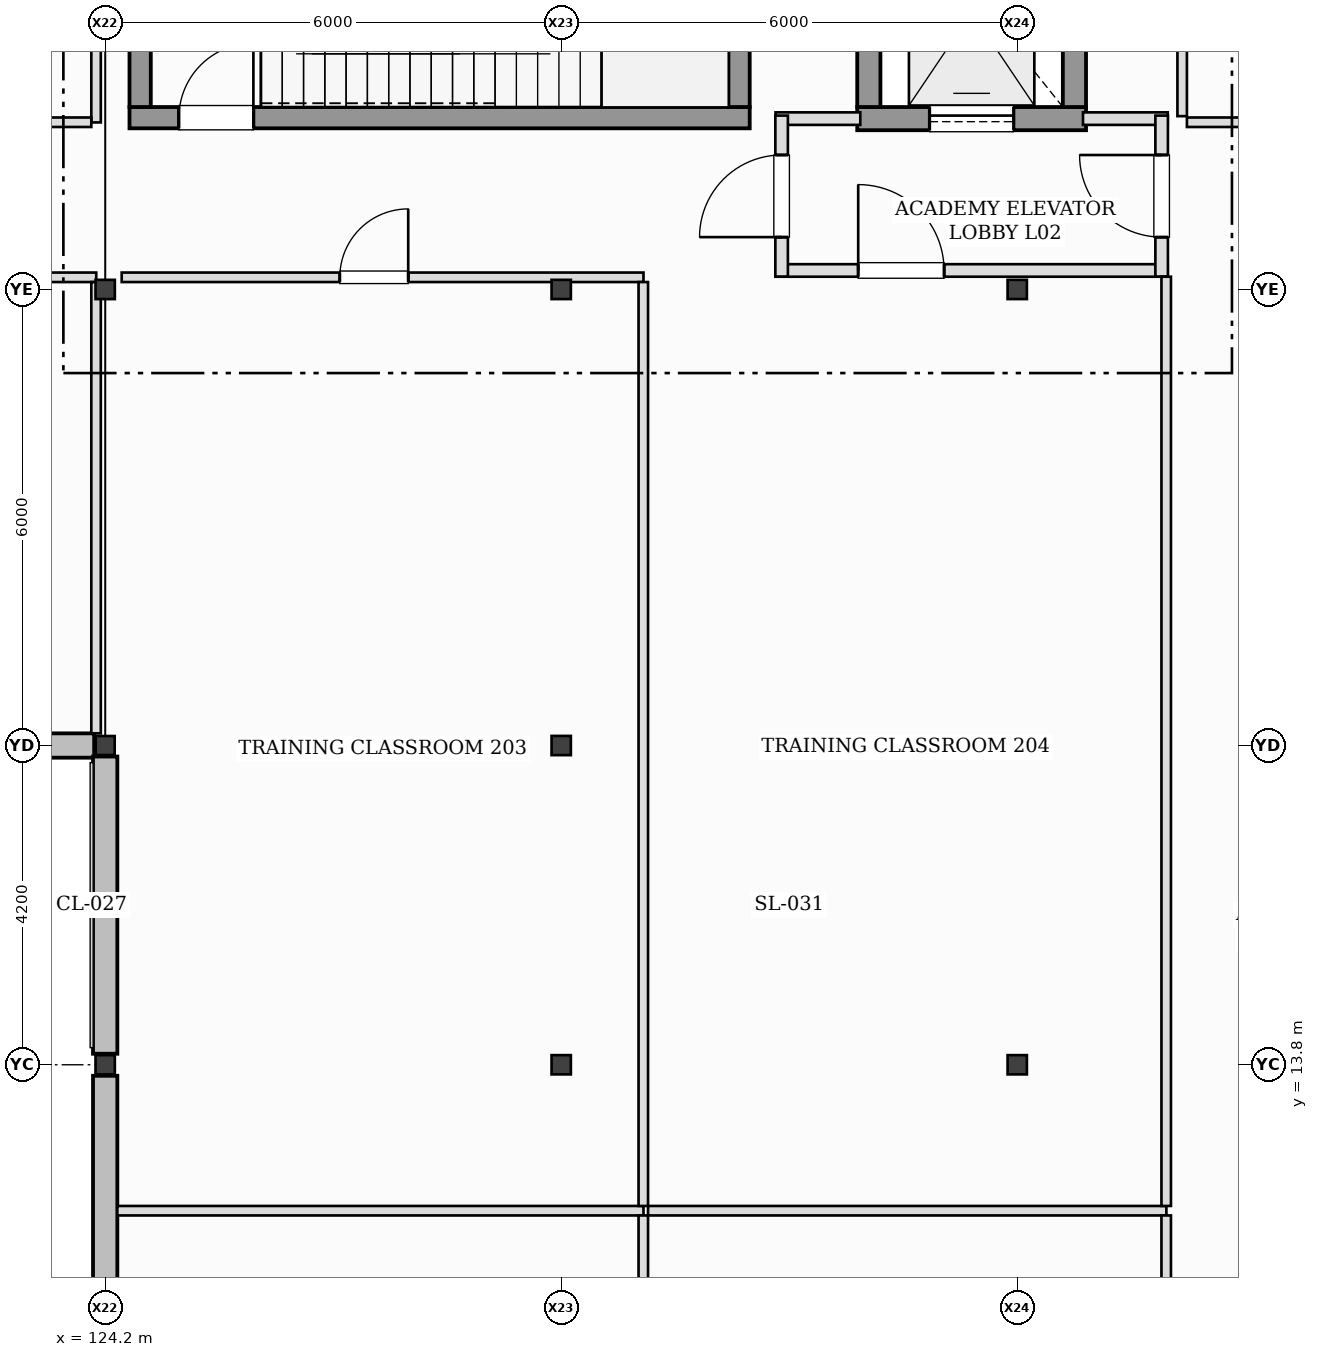
"""IFC4 building model, lengths in metres.
Left out: names, types, materials, properties, quantities, classifications, styles, units other than length and angle.
Written with IfcOpenShell. Run it as: python <this file> out.ifc"""

import sys

from ifc_helpers import new_model, si_unit, direction, frame, frame_2d, origin, origin_2d, place, context, subcontext, project, spatial, rectangle, hollow_rectangle, i_section, extrude, element, fill, save


model = new_model("IFC4")
c1 = context("Model", 3, precision=1e-05, world=origin(), true_north=direction((0.0, 1.0)))
c2 = subcontext(c1, "Body", "Model", "MODEL_VIEW")
j1 = project(units=[si_unit("LENGTHUNIT", "METRE"), si_unit("PLANEANGLEUNIT", "RADIAN")], contexts=[c1])
p1 = place(None, origin())
s1 = spatial("IfcSite", under=j1, at=p1, CompositionType="ELEMENT")
p2 = place(p1, origin())
s2 = spatial("IfcBuilding", under=s1, at=p2, CompositionType="ELEMENT")
p3 = place(p2, frame((0.0, 0.0, 6.0)))
s3 = spatial("IfcBuildingStorey", under=s2, at=p3, CompositionType="ELEMENT", Elevation=6.0)
p4 = place(p3, frame((124.2, 13.8, 0.0), z_axis=(0.0, 0.0, 1.0), x_axis=(1.0, 0.0, 0.0)))
e1 = element("IfcColumn", 1, at=p4, inside=s3, PredefinedType="COLUMN", context=c2, shape_type="SweptSolid", body=[
    extrude(i_section(OverallWidth=0.254, OverallDepth=0.253, WebThickness=0.009, FlangeThickness=0.014, at=origin_2d()), origin(), (0.0, 0.0, 1.0), 4.0),
])
p5 = place(p3, frame((124.2, 18.0, 0.0), z_axis=(0.0, 0.0, 1.0), x_axis=(1.0, 0.0, 0.0)))
e2 = element("IfcColumn", 2, at=p5, inside=s3, PredefinedType="COLUMN", context=c2, shape_type="SweptSolid", body=[
    extrude(hollow_rectangle(XDim=0.25, YDim=0.25, WallThickness=0.012, at=origin_2d()), origin(), (0.0, 0.0, 1.0), 4.0),
])
for number, where, z_axis, x_axis in (
    (3, (124.2, 24.0, 0.0), (0.0, 0.0, 1.0), (1.0, 0.0, 0.0)),
    (4, (130.2, 13.8, 0.0), (0.0, 0.0, 1.0), (1.0, 0.0, 0.0)),
    (5, (130.2, 18.0, 0.0), (0.0, 0.0, 1.0), (1.0, 0.0, 0.0)),
    (6, (130.2, 24.0, 0.0), (0.0, 0.0, 1.0), (1.0, 0.0, 0.0)),
    (7, (136.2, 13.8, 0.0), (0.0, 0.0, 1.0), (1.0, 0.0, 0.0)),
):
    element("IfcColumn", number, at=place(p3, frame(where, z_axis=z_axis, x_axis=x_axis)), inside=s3, PredefinedType="COLUMN", context=c2, shape_type="SweptSolid", body=[
        extrude(i_section(OverallWidth=0.254, OverallDepth=0.253, WebThickness=0.009, FlangeThickness=0.014, at=origin_2d()), origin(), (0.0, 0.0, 1.0), 4.0),
    ])
p6 = place(p3, frame((136.2, 18.0, 0.0), z_axis=(0.0, 0.0, 1.0), x_axis=(1.0, 0.0, 0.0)))
e8 = element("IfcColumn", 8, at=p6, inside=s3, PredefinedType="COLUMN", context=c2, shape_type="SweptSolid", body=[
    extrude(hollow_rectangle(XDim=0.25, YDim=0.25, WallThickness=0.012, at=origin_2d()), origin(), (0.0, 0.0, 1.0), 4.0),
])
p7 = place(p3, frame((136.2, 24.0, 0.0), z_axis=(0.0, 0.0, 1.0), x_axis=(1.0, 0.0, 0.0)))
e9 = element("IfcColumn", 9, at=p7, inside=s3, PredefinedType="COLUMN", context=c2, shape_type="SweptSolid", body=[
    extrude(i_section(OverallWidth=0.254, OverallDepth=0.253, WebThickness=0.009, FlangeThickness=0.014, at=origin_2d()), origin(), (0.0, 0.0, 1.0), 4.0),
])
p8 = place(p3, frame((118.345, 18.0, 0.0), z_axis=(0.0, 0.0, 1.0), x_axis=(1.0, 0.0, 0.0)))
e10 = element("IfcWall", 10, at=p8, inside=s3, PredefinedType="STANDARD", context=c2, shape_type="SweptSolid", body=[
    extrude(rectangle(XDim=5.71, YDim=0.32, at=frame_2d((2.855, 0.0))), origin(), (0.0, 0.0, 1.0), 3.619),
])
p9 = place(p8, frame((0.741, 0.0, 1.28)))
e11 = element("IfcOpeningElement", 11, at=p9, cuts=e10, PredefinedType="OPENING", context=c2, shape_type="SweptSolid", body=[
    extrude(rectangle(XDim=1.5, YDim=1.5, at=frame_2d((0.75, 0.75))), frame((0.0, 0.17, 0.0), z_axis=(0.0, -1.0, 0.0), x_axis=(1.0, 0.0, 0.0)), (0.0, 0.0, 1.0), 0.34),
])
p10 = place(p8, frame((3.525, 0.0, 1.18)))
e12 = element("IfcOpeningElement", 12, at=p10, cuts=e10, PredefinedType="OPENING", context=c2, shape_type="SweptSolid", body=[
    extrude(rectangle(XDim=1.02, YDim=1.02, at=frame_2d((0.51, 0.51))), frame((0.0, 0.17, 0.0), z_axis=(0.0, -1.0, 0.0), x_axis=(1.0, 0.0, 0.0)), (0.0, 0.0, 1.0), 0.34),
])
p11 = place(p3, frame((124.2, 13.655, 0.0), z_axis=(0.0, 0.0, 1.0), x_axis=(0.0, -1.0, 0.0)))
e13 = element("IfcWall", 13, at=p11, inside=s3, PredefinedType="STANDARD", context=c2, shape_type="SweptSolid", body=[
    extrude(rectangle(XDim=5.71, YDim=0.32, at=frame_2d((2.855, 0.0))), origin(), (0.0, 0.0, 1.0), 3.227),
])
p12 = place(p11, frame((3.933, 0.0, 1.28)))
e14 = element("IfcOpeningElement", 14, at=p12, cuts=e13, PredefinedType="OPENING", context=c2, shape_type="SweptSolid", body=[
    extrude(rectangle(XDim=0.9, YDim=0.9, at=frame_2d((0.45, 0.45))), frame((0.0, 0.17, 0.0), z_axis=(0.0, -1.0, 0.0), x_axis=(1.0, 0.0, 0.0)), (0.0, 0.0, 1.0), 0.34),
])
p13 = place(p3, frame((124.2, 17.855, 0.0), z_axis=(0.0, 0.0, 1.0), x_axis=(0.0, -1.0, 0.0)))
e15 = element("IfcWall", 15, at=p13, inside=s3, PredefinedType="STANDARD", context=c2, shape_type="SweptSolid", body=[
    extrude(rectangle(XDim=3.91, YDim=0.32, at=frame_2d((1.955, 0.0))), origin(), (0.0, 0.0, 1.0), 3.227),
])
p14 = place(p3, frame((124.52, 26.26, 0.0), z_axis=(0.0, 0.0, 1.0), x_axis=(1.0, 0.0, 0.0)))
e16 = element("IfcWall", 16, at=p14, inside=s3, PredefinedType="SHEAR", context=c2, shape_type="SweptSolid", body=[
    extrude(rectangle(XDim=8.16, YDim=0.28, at=frame_2d((4.08, 0.0))), origin(), (0.0, 0.0, 1.0), 4.0),
])
p15 = place(p14, frame((0.65, 0.0, 0.0)))
e17 = element("IfcOpeningElement", 17, at=p15, cuts=e16, PredefinedType="OPENING", context=c2, shape_type="SweptSolid", body=[
    extrude(rectangle(XDim=0.98, YDim=2.15, at=frame_2d((0.49, 1.075))), frame((0.0, 0.15, 0.0), z_axis=(0.0, -1.0, 0.0), x_axis=(1.0, 0.0, 0.0)), (0.0, 0.0, 1.0), 0.3),
])
for number, where, z_axis, x_axis in (
    (18, (124.66, 29.4, 0.0), (0.0, 0.0, 1.0), (0.0, -1.0, 0.0)),
    (19, (132.54, 26.4, 0.0), (0.0, 0.0, 1.0), (0.0, 1.0, 0.0)),
):
    element("IfcWall", number, at=place(p3, frame(where, z_axis=z_axis, x_axis=x_axis)), inside=s3, PredefinedType="SHEAR", context=c2, shape_type="SweptSolid", body=[
        extrude(rectangle(XDim=3.0, YDim=0.28, at=frame_2d((1.5, 0.0))), origin(), (0.0, 0.0, 1.0), 4.0),
    ])
p16 = place(p3, frame((134.095, 26.248, 0.0), z_axis=(0.0, 0.0, 1.0), x_axis=(1.0, 0.0, 0.0)))
e20 = element("IfcWall", 20, at=p16, inside=s3, PredefinedType="SHEAR", context=c2, shape_type="SweptSolid", body=[
    extrude(rectangle(XDim=3.01, YDim=0.305, at=frame_2d((1.505, 0.0))), origin(), (0.0, 0.0, 1.0), 4.0),
])
p17 = place(p16, frame((0.955, 0.0, 0.0)))
e21 = element("IfcOpeningElement", 21, at=p17, cuts=e20, PredefinedType="OPENING", context=c2, shape_type="SweptSolid", body=[
    extrude(rectangle(XDim=1.1, YDim=2.15, at=frame_2d((0.55, 1.075))), frame((0.0, 0.162, 0.0), z_axis=(0.0, -1.0, 0.0), x_axis=(1.0, 0.0, 0.0)), (0.0, 0.0, 1.0), 0.325),
])
for number, where, z_axis, x_axis in (
    (22, (134.248, 29.4, 0.0), (0.0, 0.0, 1.0), (0.0, -1.0, 0.0)),
    (23, (136.952, 26.4, 0.0), (0.0, 0.0, 1.0), (0.0, 1.0, 0.0)),
):
    element("IfcWall", number, at=place(p3, frame(where, z_axis=z_axis, x_axis=x_axis)), inside=s3, PredefinedType="SHEAR", context=c2, shape_type="SweptSolid", body=[
        extrude(rectangle(XDim=3.0, YDim=0.305, at=frame_2d((1.5, 0.0))), origin(), (0.0, 0.0, 1.0), 4.0),
    ])
p18 = place(p3, frame((133.02, 24.25, 0.0), z_axis=(0.0, 0.0, 1.0), x_axis=(1.0, 0.0, 0.0)))
e24 = element("IfcWall", 24, at=p18, inside=s3, PredefinedType="PARTITIONING", context=c2, shape_type="SweptSolid", body=[
    extrude(rectangle(XDim=5.16, YDim=0.165, at=frame_2d((2.58, 0.0))), origin(), (0.0, 0.0, 1.0), 3.153),
])
p19 = place(p18, frame((1.087, 0.0, 0.0)))
e25 = element("IfcOpeningElement", 25, at=p19, cuts=e24, PredefinedType="OPENING", context=c2, shape_type="SweptSolid", body=[
    extrude(rectangle(XDim=1.13, YDim=2.18, at=frame_2d((0.565, 1.09))), frame((0.0, 0.093, 0.0), z_axis=(0.0, -1.0, 0.0), x_axis=(1.0, 0.0, 0.0)), (0.0, 0.0, 1.0), 0.185),
])
for number, where, z_axis, x_axis in (
    (26, (133.02, 26.248, 0.0), (0.0, 0.0, 1.0), (1.0, 0.0, 0.0)),
    (27, (137.065, 26.248, 0.0), (0.0, 0.0, 1.0), (1.0, 0.0, 0.0)),
):
    element("IfcWall", number, at=place(p3, frame(where, z_axis=z_axis, x_axis=x_axis)), inside=s3, PredefinedType="PARTITIONING", context=c2, shape_type="SweptSolid", body=[
        extrude(rectangle(XDim=1.115, YDim=0.165, at=frame_2d((0.558, 0.0))), origin(), (0.0, 0.0, 1.0), 3.72),
    ])
p20 = place(p3, frame((133.1, 24.17, 0.0), z_axis=(0.0, 0.0, 1.0), x_axis=(0.0, 1.0, 0.0)))
e28 = element("IfcWall", 28, at=p20, inside=s3, PredefinedType="PARTITIONING", context=c2, shape_type="SweptSolid", body=[
    extrude(rectangle(XDim=2.118, YDim=0.165, at=frame_2d((1.059, 0.0))), origin(), (0.0, 0.0, 1.0), 3.72),
])
p21 = place(p20, frame((0.519, 0.0, 0.0)))
e29 = element("IfcOpeningElement", 29, at=p21, cuts=e28, PredefinedType="OPENING", context=c2, shape_type="SweptSolid", body=[
    extrude(rectangle(XDim=1.08, YDim=2.14, at=frame_2d((0.54, 1.07))), frame((0.0, 0.093, 0.0), z_axis=(0.0, -1.0, 0.0), x_axis=(1.0, 0.0, 0.0)), (0.0, 0.0, 1.0), 0.185),
])
p22 = place(p3, frame((138.1, 24.17, 0.0), z_axis=(0.0, 0.0, 1.0), x_axis=(0.0, 1.0, 0.0)))
e30 = element("IfcWall", 30, at=p22, inside=s3, PredefinedType="PARTITIONING", context=c2, shape_type="SweptSolid", body=[
    extrude(rectangle(XDim=2.118, YDim=0.165, at=frame_2d((1.059, 0.0))), origin(), (0.0, 0.0, 1.0), 3.379),
])
p23 = place(p22, frame((0.519, 0.0, 0.0)))
e31 = element("IfcOpeningElement", 31, at=p23, cuts=e30, PredefinedType="OPENING", context=c2, shape_type="SweptSolid", body=[
    extrude(rectangle(XDim=1.08, YDim=2.14, at=frame_2d((0.54, 1.07))), frame((0.0, 0.093, 0.0), z_axis=(0.0, -1.0, 0.0), x_axis=(1.0, 0.0, 0.0)), (0.0, 0.0, 1.0), 0.185),
])
p24 = place(p3, frame((114.298, 24.16, 0.0), z_axis=(0.0, 0.0, 1.0), x_axis=(1.0, 0.0, 0.0)))
e32 = element("IfcWall", 32, at=p24, inside=s3, PredefinedType="PARTITIONING", context=c2, shape_type="SweptSolid", body=[
    extrude(rectangle(XDim=9.785, YDim=0.125, at=frame_2d((4.893, 0.0))), origin(), (0.0, 0.0, 1.0), 3.72),
])
p25 = place(p24, frame((4.44, 0.0, 0.0)))
e33 = element("IfcOpeningElement", 33, at=p25, cuts=e32, PredefinedType="OPENING", context=c2, shape_type="SweptSolid", body=[
    extrude(rectangle(XDim=1.58, YDim=2.2, at=frame_2d((0.79, 1.1))), frame((0.0, 0.073, 0.0), z_axis=(0.0, -1.0, 0.0), x_axis=(1.0, 0.0, 0.0)), (0.0, 0.0, 1.0), 0.145),
])
p26 = place(p3, frame((124.08, 24.097, 0.0), z_axis=(0.0, 0.0, 1.0), x_axis=(0.0, -1.0, 0.0)))
e34 = element("IfcWall", 34, at=p26, inside=s3, PredefinedType="PARTITIONING", context=c2, shape_type="SweptSolid", body=[
    extrude(rectangle(XDim=5.938, YDim=0.125, at=frame_2d((2.969, 0.0))), origin(), (0.0, 0.0, 1.0), 3.72),
])
p27 = place(p3, frame((124.08, 29.84, 0.0), z_axis=(0.0, 0.0, 1.0), x_axis=(0.0, -1.0, 0.0)))
e35 = element("IfcWall", 35, at=p27, inside=s3, PredefinedType="PARTITIONING", context=c2, shape_type="SweptSolid", body=[
    extrude(rectangle(XDim=3.643, YDim=0.125, at=frame_2d((1.821, 0.0))), origin(), (0.0, 0.0, 1.0), 3.72),
])
p28 = place(p3, frame((124.018, 26.2, 0.0), z_axis=(0.0, 0.0, 1.0), x_axis=(-1.0, 0.0, 0.0)))
e36 = element("IfcWall", 36, at=p28, inside=s3, PredefinedType="PARTITIONING", context=c2, shape_type="SweptSolid", body=[
    extrude(rectangle(XDim=9.655, YDim=0.125, at=frame_2d((4.828, 0.0))), origin(), (0.0, 0.0, 1.0), 3.72),
])
p29 = place(p28, frame((4.2, 0.0, 0.0)))
e37 = element("IfcOpeningElement", 37, at=p29, cuts=e36, PredefinedType="OPENING", context=c2, shape_type="SweptSolid", body=[
    extrude(rectangle(XDim=1.03, YDim=2.15, at=frame_2d((0.515, 1.075))), frame((0.0, 0.073, 0.0), z_axis=(0.0, -1.0, 0.0), x_axis=(1.0, 0.0, 0.0)), (0.0, 0.0, 1.0), 0.145),
])
p30 = place(p3, frame((124.36, 11.88, 0.0), z_axis=(0.0, 0.0, 1.0), x_axis=(1.0, 0.0, 0.0)))
e38 = element("IfcWall", 38, at=p30, inside=s3, PredefinedType="PARTITIONING", context=c2, shape_type="SweptSolid", body=[
    extrude(rectangle(XDim=6.922, YDim=0.125, at=frame_2d((3.461, 0.0))), origin(), (0.0, 0.0, 1.0), 3.72),
])
p31 = place(p3, frame((131.28, 11.817, 0.0), z_axis=(0.0, 0.0, 1.0), x_axis=(0.0, -1.0, 0.0)))
e39 = element("IfcWall", 39, at=p31, inside=s3, PredefinedType="PARTITIONING", context=c2, shape_type="SweptSolid", body=[
    extrude(rectangle(XDim=9.857, YDim=0.125, at=frame_2d((4.929, 0.0))), origin(), (0.0, 0.0, 1.0), 3.72),
])
p32 = place(p31, frame((4.574, 0.0, 0.0)))
e40 = element("IfcOpeningElement", 40, at=p32, cuts=e39, PredefinedType="OPENING", context=c2, shape_type="SweptSolid", body=[
    extrude(rectangle(XDim=0.93, YDim=2.1, at=frame_2d((0.465, 1.05))), frame((0.0, 0.073, 0.0), z_axis=(0.0, -1.0, 0.0), x_axis=(1.0, 0.0, 0.0)), (0.0, 0.0, 1.0), 0.145),
])
p33 = place(p3, frame((131.343, 11.88, 0.0), z_axis=(0.0, 0.0, 1.0), x_axis=(1.0, 0.0, 0.0)))
e41 = element("IfcWall", 41, at=p33, inside=s3, PredefinedType="PARTITIONING", context=c2, shape_type="SweptSolid", body=[
    extrude(rectangle(XDim=6.82, YDim=0.125, at=frame_2d((3.41, 0.0))), origin(), (0.0, 0.0, 1.0), 3.72),
])
p34 = place(p3, frame((138.16, 11.817, 0.0), z_axis=(0.0, 0.0, 1.0), x_axis=(0.0, -1.0, 0.0)))
e42 = element("IfcWall", 42, at=p34, inside=s3, PredefinedType="PARTITIONING", context=c2, shape_type="SweptSolid", body=[
    extrude(rectangle(XDim=9.857, YDim=0.125, at=frame_2d((4.929, 0.0))), origin(), (0.0, 0.0, 1.0), 3.449),
])
p35 = place(p34, frame((4.349, 0.0, 0.0)))
e43 = element("IfcOpeningElement", 43, at=p35, cuts=e42, PredefinedType="OPENING", context=c2, shape_type="SweptSolid", body=[
    extrude(rectangle(XDim=1.16, YDim=2.2, at=frame_2d((0.58, 1.1))), frame((0.0, 0.073, 0.0), z_axis=(0.0, -1.0, 0.0), x_axis=(1.0, 0.0, 0.0)), (0.0, 0.0, 1.0), 0.145),
])
p36 = place(p3, frame((124.417, 24.16, 0.0), z_axis=(0.0, 0.0, 1.0), x_axis=(1.0, 0.0, 0.0)))
e44 = element("IfcWall", 44, at=p36, inside=s3, PredefinedType="PARTITIONING", context=c2, shape_type="SweptSolid", body=[
    extrude(rectangle(XDim=6.865, YDim=0.125, at=frame_2d((3.433, 0.0))), origin(), (0.0, 0.0, 1.0), 3.153),
])
p37 = place(p36, frame((2.87, 0.0, 0.0)))
e45 = element("IfcOpeningElement", 45, at=p37, cuts=e44, PredefinedType="OPENING", context=c2, shape_type="SweptSolid", body=[
    extrude(rectangle(XDim=0.9, YDim=2.1, at=frame_2d((0.45, 1.05))), frame((0.0, 0.073, 0.0), z_axis=(0.0, -1.0, 0.0), x_axis=(1.0, 0.0, 0.0)), (0.0, 0.0, 1.0), 0.145),
])
p38 = place(p3, frame((131.28, 24.097, 0.0), z_axis=(0.0, 0.0, 1.0), x_axis=(0.0, -1.0, 0.0)))
e46 = element("IfcWall", 46, at=p38, inside=s3, PredefinedType="PARTITIONING", context=c2, shape_type="SweptSolid", body=[
    extrude(rectangle(XDim=12.155, YDim=0.125, at=frame_2d((6.078, 0.0))), origin(), (0.0, 0.0, 1.0), 3.72),
])
p39 = place(p3, frame((138.16, 24.167, 0.0), z_axis=(0.0, 0.0, 1.0), x_axis=(0.0, -1.0, 0.0)))
e47 = element("IfcWall", 47, at=p39, inside=s3, PredefinedType="PARTITIONING", context=c2, shape_type="SweptSolid", body=[
    extrude(rectangle(XDim=12.225, YDim=0.125, at=frame_2d((6.113, 0.0))), origin(), (0.0, 0.0, 1.0), 3.289),
])
p40 = place(p3, frame((138.37, 26.28, 0.0), z_axis=(0.0, 0.0, 1.0), x_axis=(0.0, 1.0, 0.0)))
e48 = element("IfcWall", 48, at=p40, inside=s3, PredefinedType="PARTITIONING", context=c2, shape_type="SweptSolid", body=[
    extrude(rectangle(XDim=3.56, YDim=0.125, at=frame_2d((1.78, 0.0))), origin(), (0.0, 0.0, 1.0), 3.379),
])
p41 = place(p3, frame((157.72, 26.2, 0.0), z_axis=(0.0, 0.0, 1.0), x_axis=(-1.0, 0.0, 0.0)))
e49 = element("IfcWall", 49, at=p41, inside=s3, PredefinedType="PARTITIONING", context=c2, shape_type="SweptSolid", body=[
    extrude(rectangle(XDim=19.287, YDim=0.125, at=frame_2d((9.644, 0.0))), origin(), (0.0, 0.0, 1.0), 3.72),
])
p42 = place(p41, frame((9.018, 0.0, 0.0)))
e50 = element("IfcOpeningElement", 50, at=p42, cuts=e49, PredefinedType="OPENING", context=c2, shape_type="SweptSolid", body=[
    extrude(rectangle(XDim=1.03, YDim=2.15, at=frame_2d((0.515, 1.075))), frame((0.0, 0.073, 0.0), z_axis=(0.0, -1.0, 0.0), x_axis=(1.0, 0.0, 0.0)), (0.0, 0.0, 1.0), 0.145),
])
p43 = place(p15, origin())
e51 = element("IfcDoor", 51, at=p43, inside=s3, OperationType="SINGLE_SWING_RIGHT", PredefinedType="DOOR", context=c2, shape_type="SweptSolid", body=[
    extrude(rectangle(XDim=0.98, YDim=2.15, at=frame_2d((0.49, 1.075))), frame((0.0, 0.025, 0.0), z_axis=(0.0, -1.0, 0.0), x_axis=(1.0, 0.0, 0.0)), (0.0, 0.0, 1.0), 0.05),
])
fill(e17, e51)
p44 = place(p17, origin())
e52 = element("IfcDoor", 52, at=p44, inside=s3, OperationType="SLIDING_TO_LEFT", PredefinedType="DOOR", context=c2, shape_type="SweptSolid", body=[
    extrude(rectangle(XDim=1.1, YDim=2.15, at=frame_2d((0.55, 1.075))), frame((0.0, 0.025, 0.0), z_axis=(0.0, -1.0, 0.0), x_axis=(1.0, 0.0, 0.0)), (0.0, 0.0, 1.0), 0.05),
])
fill(e21, e52)
p45 = place(p21, frame((1.08, 0.0, 0.0), z_axis=(0.0, 0.0, 1.0), x_axis=(-1.0, 0.0, 0.0)))
e53 = element("IfcDoor", 53, at=p45, inside=s3, OperationType="SINGLE_SWING_LEFT", PredefinedType="DOOR", context=c2, shape_type="SweptSolid", body=[
    extrude(rectangle(XDim=1.08, YDim=2.14, at=frame_2d((0.54, 1.07))), frame((0.0, 0.025, 0.0), z_axis=(0.0, -1.0, 0.0), x_axis=(1.0, 0.0, 0.0)), (0.0, 0.0, 1.0), 0.05),
])
fill(e29, e53)
p46 = place(p23, origin())
e54 = element("IfcDoor", 54, at=p46, inside=s3, OperationType="SINGLE_SWING_RIGHT", PredefinedType="DOOR", context=c2, shape_type="SweptSolid", body=[
    extrude(rectangle(XDim=1.08, YDim=2.14, at=frame_2d((0.54, 1.07))), frame((0.0, 0.025, 0.0), z_axis=(0.0, -1.0, 0.0), x_axis=(1.0, 0.0, 0.0)), (0.0, 0.0, 1.0), 0.05),
])
fill(e31, e54)
p47 = place(p37, frame((0.9, 0.0, 0.0), z_axis=(0.0, 0.0, 1.0), x_axis=(-1.0, 0.0, 0.0)))
e55 = element("IfcDoor", 55, at=p47, inside=s3, OperationType="SINGLE_SWING_RIGHT", PredefinedType="DOOR", context=c2, shape_type="SweptSolid", body=[
    extrude(rectangle(XDim=0.9, YDim=2.1, at=frame_2d((0.45, 1.05))), frame((0.0, 0.025, 0.0), z_axis=(0.0, -1.0, 0.0), x_axis=(1.0, 0.0, 0.0)), (0.0, 0.0, 1.0), 0.05),
])
fill(e45, e55)
p48 = place(p19, frame((1.13, 0.0, 0.0), z_axis=(0.0, 0.0, 1.0), x_axis=(-1.0, 0.0, 0.0)))
e56 = element("IfcDoor", 56, at=p48, inside=s3, OperationType="SINGLE_SWING_LEFT", PredefinedType="DOOR", context=c2, shape_type="SweptSolid", body=[
    extrude(rectangle(XDim=1.13, YDim=2.18, at=frame_2d((0.565, 1.09))), frame((0.0, 0.025, 0.0), z_axis=(0.0, -1.0, 0.0), x_axis=(1.0, 0.0, 0.0)), (0.0, 0.0, 1.0), 0.05),
])
fill(e25, e56)
save(model, sys.argv[1])
